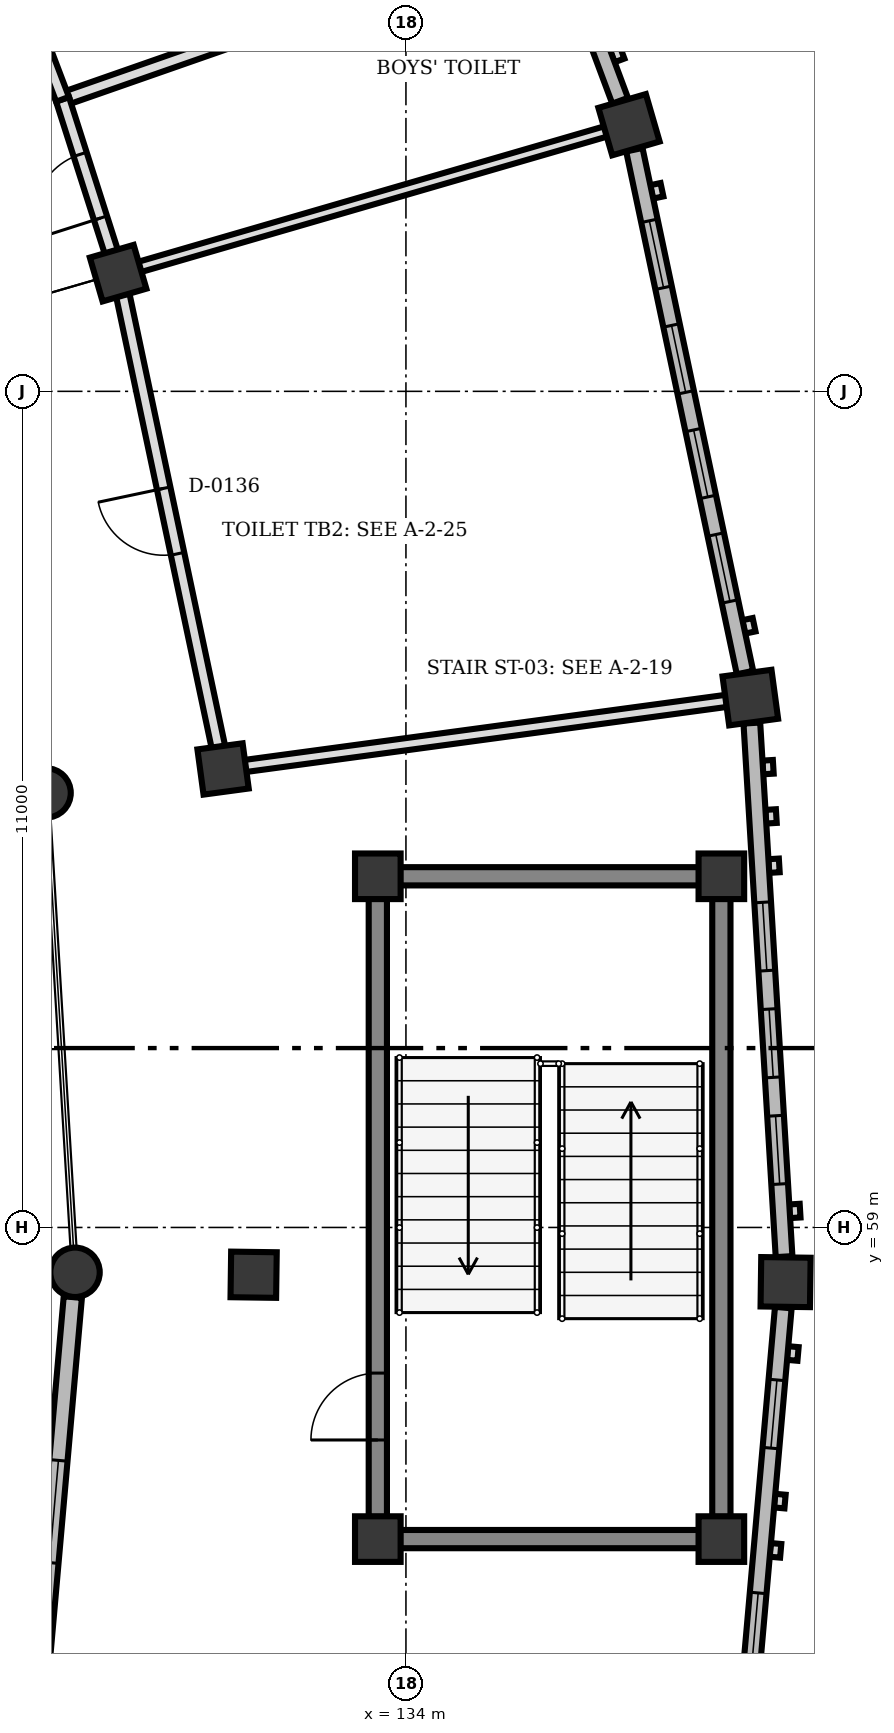
"""IFC4 building model, lengths in metres.
Left out: names, types, materials, properties, quantities, classifications, styles, units other than length and angle.
Written with IfcOpenShell. Run it as: python <this file> out.ifc"""

import sys

from ifc_helpers import new_model, si_unit, direction, frame, frame_2d, origin, origin_2d, place, context, subcontext, project, spatial, rectangle, circle, extrude, element, fill, save


model = new_model("IFC4")
c1 = context("Model", 3, precision=1e-05, world=origin(), true_north=direction((0.0, 1.0)))
c2 = subcontext(c1, "Body", "Model", "MODEL_VIEW")
j1 = project(units=[si_unit("LENGTHUNIT", "METRE"), si_unit("PLANEANGLEUNIT", "RADIAN")], contexts=[c1])
p1 = place(None, origin())
s1 = spatial("IfcSite", under=j1, at=p1, CompositionType="ELEMENT")
p2 = place(p1, origin())
s2 = spatial("IfcBuilding", under=s1, at=p2, CompositionType="ELEMENT")
p3 = place(p2, origin())
s3 = spatial("IfcBuildingStorey", under=s2, at=p3, CompositionType="ELEMENT", Elevation=0.0)
for number, where, z_axis, x_axis in (
    (1, (133.63, 54.9, 0.0), (0.0, 0.0, 1.0), (1.0, 0.0, 0.0)),
    (2, (138.15, 54.9, 0.0), (0.0, 0.0, 1.0), (1.0, 0.0, 0.0)),
    (3, (138.15, 63.62, 0.0), (0.0, 0.0, 1.0), (1.0, 0.0, 0.0)),
    (4, (133.63, 63.62, 0.0), (0.0, 0.0, 1.0), (1.0, 0.0, 0.0)),
):
    element("IfcColumn", number, at=place(p3, frame(where, z_axis=z_axis, x_axis=x_axis)), inside=s3, PredefinedType="COLUMN", context=c2, shape_type="SweptSolid", body=[
        extrude(rectangle(XDim=0.6, YDim=0.6, at=origin_2d()), origin(), (0.0, 0.0, 1.0), 4.5),
    ])
for number, where, z_axis, x_axis in (
    (5, (129.646, 58.41, 0.0), (0.0, 0.0, 1.0), (1.0, 0.0, 0.0)),
    (6, (129.265, 64.717, 0.0), (0.0, 0.0, 1.0), (1.0, 0.0, 0.0)),
):
    element("IfcColumn", number, at=place(p3, frame(where, z_axis=z_axis, x_axis=x_axis)), inside=s3, PredefinedType="COLUMN", context=c2, shape_type="SweptSolid", body=[
        extrude(circle(Radius=0.325, at=origin_2d()), origin(), (0.0, 0.0, 1.0), 4.5),
    ])
for number, where, z_axis, x_axis in (
    (7, (131.996, 58.378, 0.0), (0.0, 0.0, 1.0), (1.0, -0.014, 0.0)),
    (8, (131.594, 65.032, 0.0), (0.0, 0.0, 1.0), (0.991, 0.134, 0.0)),
    (9, (130.213, 71.555, 0.0), (0.0, 0.0, 1.0), (0.96, 0.279, 0.0)),
):
    element("IfcColumn", number, at=place(p3, frame(where, z_axis=z_axis, x_axis=x_axis)), inside=s3, PredefinedType="COLUMN", context=c2, shape_type="SweptSolid", body=[
        extrude(rectangle(XDim=0.6, YDim=0.6, at=origin_2d()), origin(), (0.0, 0.0, 1.0), 4.5),
    ])
for number, where, z_axis, x_axis in (
    (10, (138.995, 58.281, 0.0), (0.0, 0.0, 1.0), (1.0, -0.014, 0.0)),
    (11, (138.531, 65.971, 0.0), (0.0, 0.0, 1.0), (0.991, 0.134, 0.0)),
    (12, (136.935, 73.508, 0.0), (0.0, 0.0, 1.0), (0.96, 0.279, 0.0)),
):
    element("IfcColumn", number, at=place(p3, frame(where, z_axis=z_axis, x_axis=x_axis)), inside=s3, PredefinedType="COLUMN", context=c2, shape_type="SweptSolid", body=[
        extrude(rectangle(XDim=0.65, YDim=0.65, at=origin_2d()), origin(), (0.0, 0.0, 1.0), 4.5),
    ])
p4 = place(p3, frame((138.965, 57.946, 0.0), z_axis=(0.0, 0.0, 1.0), x_axis=(-0.087777274836, -0.996140125696, 0.0)))
e13 = element("IfcWall", 13, at=p4, inside=s3, PredefinedType="SOLIDWALL", context=c2, shape_type="SweptSolid", body=[
    extrude(rectangle(XDim=7.031, YDim=0.22, at=frame_2d((3.516, 0.0))), origin(), (0.0, 0.0, 1.0), 3.55),
])
p5 = place(p4, frame((0.956, 0.0, 0.85)))
e14 = element("IfcOpeningElement", 14, at=p5, cuts=e13, PredefinedType="OPENING", context=c2, shape_type="SweptSolid", body=[
    extrude(rectangle(XDim=0.9, YDim=1.4, at=frame_2d((0.45, 0.7))), frame((0.0, 0.12, 0.0), z_axis=(0.0, -1.0, 0.0), x_axis=(1.0, 0.0, 0.0)), (0.0, 0.0, 1.0), 0.24),
])
p6 = place(p4, frame((3.769, 0.0, 0.85)))
e15 = element("IfcOpeningElement", 15, at=p6, cuts=e13, PredefinedType="OPENING", context=c2, shape_type="SweptSolid", body=[
    extrude(rectangle(XDim=0.9, YDim=1.4, at=frame_2d((0.45, 0.7))), frame((0.0, 0.12, 0.0), z_axis=(0.0, -1.0, 0.0), x_axis=(1.0, 0.0, 0.0)), (0.0, 0.0, 1.0), 0.24),
])
p7 = place(p4, frame((5.175, 0.0, 0.85)))
e16 = element("IfcOpeningElement", 16, at=p7, cuts=e13, PredefinedType="OPENING", context=c2, shape_type="SweptSolid", body=[
    extrude(rectangle(XDim=0.9, YDim=1.4, at=frame_2d((0.45, 0.7))), frame((0.0, 0.12, 0.0), z_axis=(0.0, -1.0, 0.0), x_axis=(1.0, 0.0, 0.0)), (0.0, 0.0, 1.0), 0.24),
])
p8 = place(p3, frame((129.12, 52.442, 0.0), z_axis=(0.0, 0.0, 1.0), x_axis=(0.087717690898, 0.996145374282, 0.0)))
e17 = element("IfcWall", 17, at=p8, inside=s3, PredefinedType="SOLIDWALL", context=c2, shape_type="SweptSolid", body=[
    extrude(rectangle(XDim=5.664, YDim=0.24, at=frame_2d((2.832, 0.0))), origin(), (0.0, 0.0, 1.0), 3.55),
])
p9 = place(p8, frame((2.157, 0.0, 0.9)))
e18 = element("IfcOpeningElement", 18, at=p9, cuts=e17, PredefinedType="OPENING", context=c2, shape_type="SweptSolid", body=[
    extrude(rectangle(XDim=1.35, YDim=1.7, at=frame_2d((0.675, 0.85))), frame((0.0, 0.13, 0.0), z_axis=(0.0, -1.0, 0.0), x_axis=(1.0, 0.0, 0.0)), (0.0, 0.0, 1.0), 0.26),
])
p10 = place(p3, frame((138.551, 65.636, 0.0), z_axis=(0.0, 0.0, 1.0), x_axis=(0.06029906372, -0.998180355905, 0.0)))
e19 = element("IfcWall", 19, at=p10, inside=s3, PredefinedType="SOLIDWALL", context=c2, shape_type="SweptSolid", body=[
    extrude(rectangle(XDim=7.033, YDim=0.22, at=frame_2d((3.516, 0.0))), origin(), (0.0, 0.0, 1.0), 3.55),
])
p11 = place(p10, frame((2.363, 0.0, 0.85)))
e20 = element("IfcOpeningElement", 20, at=p11, cuts=e19, PredefinedType="OPENING", context=c2, shape_type="SweptSolid", body=[
    extrude(rectangle(XDim=0.9, YDim=1.4, at=frame_2d((0.45, 0.7))), frame((0.0, 0.12, 0.0), z_axis=(0.0, -1.0, 0.0), x_axis=(1.0, 0.0, 0.0)), (0.0, 0.0, 1.0), 0.24),
])
p12 = place(p10, frame((3.77, 0.0, 0.85)))
e21 = element("IfcOpeningElement", 21, at=p12, cuts=e19, PredefinedType="OPENING", context=c2, shape_type="SweptSolid", body=[
    extrude(rectangle(XDim=0.9, YDim=1.4, at=frame_2d((0.45, 0.7))), frame((0.0, 0.12, 0.0), z_axis=(0.0, -1.0, 0.0), x_axis=(1.0, 0.0, 0.0)), (0.0, 0.0, 1.0), 0.24),
])
p13 = place(p10, frame((5.176, 0.0, 0.85)))
e22 = element("IfcOpeningElement", 22, at=p13, cuts=e19, PredefinedType="OPENING", context=c2, shape_type="SweptSolid", body=[
    extrude(rectangle(XDim=0.9, YDim=1.4, at=frame_2d((0.45, 0.7))), frame((0.0, 0.12, 0.0), z_axis=(0.0, -1.0, 0.0), x_axis=(1.0, 0.0, 0.0)), (0.0, 0.0, 1.0), 0.24),
])
p14 = place(p3, frame((137.005, 73.179, 0.0), z_axis=(0.0, 0.0, 1.0), x_axis=(0.207081302077, -0.978323736976, 0.0)))
e23 = element("IfcWall", 23, at=p14, inside=s3, PredefinedType="SOLIDWALL", context=c2, shape_type="SweptSolid", body=[
    extrude(rectangle(XDim=7.031, YDim=0.22, at=frame_2d((3.516, 0.0))), origin(), (0.0, 0.0, 1.0), 3.55),
])
p15 = place(p14, frame((0.956, 0.0, 0.85)))
e24 = element("IfcOpeningElement", 24, at=p15, cuts=e23, PredefinedType="OPENING", context=c2, shape_type="SweptSolid", body=[
    extrude(rectangle(XDim=0.9, YDim=1.4, at=frame_2d((0.45, 0.7))), frame((0.0, 0.12, 0.0), z_axis=(0.0, -1.0, 0.0), x_axis=(1.0, 0.0, 0.0)), (0.0, 0.0, 1.0), 0.24),
])
p16 = place(p14, frame((2.363, 0.0, 0.85)))
e25 = element("IfcOpeningElement", 25, at=p16, cuts=e23, PredefinedType="OPENING", context=c2, shape_type="SweptSolid", body=[
    extrude(rectangle(XDim=0.9, YDim=1.4, at=frame_2d((0.45, 0.7))), frame((0.0, 0.12, 0.0), z_axis=(0.0, -1.0, 0.0), x_axis=(1.0, 0.0, 0.0)), (0.0, 0.0, 1.0), 0.24),
])
p17 = place(p14, frame((3.769, 0.0, 0.85)))
e26 = element("IfcOpeningElement", 26, at=p17, cuts=e23, PredefinedType="OPENING", context=c2, shape_type="SweptSolid", body=[
    extrude(rectangle(XDim=0.9, YDim=1.4, at=frame_2d((0.45, 0.7))), frame((0.0, 0.12, 0.0), z_axis=(0.0, -1.0, 0.0), x_axis=(1.0, 0.0, 0.0)), (0.0, 0.0, 1.0), 0.24),
])
p18 = place(p14, frame((5.175, 0.0, 0.85)))
e27 = element("IfcOpeningElement", 27, at=p18, cuts=e23, PredefinedType="OPENING", context=c2, shape_type="SweptSolid", body=[
    extrude(rectangle(XDim=0.9, YDim=1.4, at=frame_2d((0.45, 0.7))), frame((0.0, 0.12, 0.0), z_axis=(0.0, -1.0, 0.0), x_axis=(1.0, 0.0, 0.0)), (0.0, 0.0, 1.0), 0.24),
])
p19 = place(p3, frame((134.361, 80.411, 0.0), z_axis=(0.0, 0.0, 1.0), x_axis=(0.349448583385, -0.936955541939, 0.0)))
e28 = element("IfcWall", 28, at=p19, inside=s3, PredefinedType="SOLIDWALL", context=c2, shape_type="SweptSolid", body=[
    extrude(rectangle(XDim=7.031, YDim=0.22, at=frame_2d((3.516, 0.0))), origin(), (0.0, 0.0, 1.0), 3.55),
])
p20 = place(p19, frame((0.584, 0.0, 1.15)))
e29 = element("IfcOpeningElement", 29, at=p20, cuts=e28, PredefinedType="OPENING", context=c2, shape_type="SweptSolid", body=[
    extrude(rectangle(XDim=0.8, YDim=1.1, at=frame_2d((0.4, 0.55))), frame((0.0, 0.12, 0.0), z_axis=(0.0, -1.0, 0.0), x_axis=(1.0, 0.0, 0.0)), (0.0, 0.0, 1.0), 0.24),
])
p21 = place(p19, frame((2.834, 0.0, 1.15)))
e30 = element("IfcOpeningElement", 30, at=p21, cuts=e28, PredefinedType="OPENING", context=c2, shape_type="SweptSolid", body=[
    extrude(rectangle(XDim=0.8, YDim=1.1, at=frame_2d((0.4, 0.55))), frame((0.0, 0.12, 0.0), z_axis=(0.0, -1.0, 0.0), x_axis=(1.0, 0.0, 0.0)), (0.0, 0.0, 1.0), 0.24),
])
p22 = place(p19, frame((5.366, 0.0, 1.15)))
e31 = element("IfcOpeningElement", 31, at=p22, cuts=e28, PredefinedType="OPENING", context=c2, shape_type="SweptSolid", body=[
    extrude(rectangle(XDim=0.8, YDim=1.1, at=frame_2d((0.4, 0.55))), frame((0.0, 0.12, 0.0), z_axis=(0.0, -1.0, 0.0), x_axis=(1.0, 0.0, 0.0)), (0.0, 0.0, 1.0), 0.24),
])
p23 = place(p3, frame((133.63, 55.192, 0.0), z_axis=(0.0, 0.0, 1.0), x_axis=(0.0, 1.0, 0.0)))
e32 = element("IfcWall", 32, at=p23, inside=s3, PredefinedType="SHEAR", context=c2, shape_type="SweptSolid", body=[
    extrude(rectangle(XDim=8.136, YDim=0.24, at=frame_2d((4.068, 0.0))), origin(), (0.0, 0.0, 1.0), 4.24),
])
p24 = place(p23, frame((1.012, 0.0, 0.0)))
e33 = element("IfcOpeningElement", 33, at=p24, cuts=e32, PredefinedType="OPENING", context=c2, shape_type="SweptSolid", body=[
    extrude(rectangle(XDim=0.88, YDim=2.1, at=frame_2d((0.44, 1.05))), frame((0.0, 0.13, 0.0), z_axis=(0.0, -1.0, 0.0), x_axis=(1.0, 0.0, 0.0)), (0.0, 0.0, 1.0), 0.26),
])
p25 = place(p3, frame((138.15, 63.328, 0.0), z_axis=(0.0, 0.0, 1.0), x_axis=(0.0, -1.0, 0.0)))
e34 = element("IfcWall", 34, at=p25, inside=s3, PredefinedType="SHEAR", context=c2, shape_type="SweptSolid", body=[
    extrude(rectangle(XDim=8.136, YDim=0.24, at=frame_2d((4.068, 0.0))), origin(), (0.0, 0.0, 1.0), 4.24),
])
for number, where, z_axis, x_axis in (
    (35, (137.858, 54.9, 0.0), (0.0, 0.0, 1.0), (-1.0, 0.0, 0.0)),
    (36, (137.858, 63.62, 0.0), (0.0, 0.0, 1.0), (-1.0, 0.0, 0.0)),
):
    element("IfcWall", number, at=place(p3, frame(where, z_axis=z_axis, x_axis=x_axis)), inside=s3, PredefinedType="SHEAR", context=c2, shape_type="SweptSolid", body=[
        extrude(rectangle(XDim=3.936, YDim=0.24, at=frame_2d((1.968, 0.0))), origin(), (0.0, 0.0, 1.0), 4.24),
    ])
p26 = place(p3, frame((131.883, 65.071, 0.0), z_axis=(0.0, 0.0, 1.0), x_axis=(0.990971868219, 0.134069968295, 0.0)))
e37 = element("IfcWall", 37, at=p26, inside=s3, PredefinedType="PARTITIONING", context=c2, shape_type="SweptSolid", body=[
    extrude(rectangle(XDim=6.392, YDim=0.16, at=frame_2d((3.196, 0.0))), origin(), (0.0, 0.0, 1.0), 3.572),
])
p27 = place(p3, frame((130.493, 71.636, 0.0), z_axis=(0.0, 0.0, 1.0), x_axis=(0.960267345013, 0.279081755231, 0.0)))
e38 = element("IfcWall", 38, at=p27, inside=s3, PredefinedType="PARTITIONING", context=c2, shape_type="SweptSolid", body=[
    extrude(rectangle(XDim=6.392, YDim=0.14, at=frame_2d((3.196, 0.0))), origin(), (0.0, 0.0, 1.0), 3.572),
])
p28 = place(p3, frame((129.482, 73.842, 0.0), z_axis=(0.0, 0.0, 1.0), x_axis=(0.944038525113, 0.329835205979, 0.0)))
e39 = element("IfcWall", 39, at=p28, inside=s3, PredefinedType="PARTITIONING", context=c2, shape_type="SweptSolid", body=[
    extrude(rectangle(XDim=6.755, YDim=0.18, at=frame_2d((3.377, 0.0))), origin(), (0.0, 0.0, 1.0), 3.572),
])
p29 = place(p3, frame((131.533, 65.318, 0.0), z_axis=(0.0, 0.0, 1.0), x_axis=(-0.206987404473, 0.978343607527, 0.0)))
e40 = element("IfcWall", 40, at=p29, inside=s3, PredefinedType="PARTITIONING", context=c2, shape_type="SweptSolid", body=[
    extrude(rectangle(XDim=6.083, YDim=0.18, at=frame_2d((3.042, 0.0))), origin(), (0.0, 0.0, 1.0), 3.572),
])
p30 = place(p29, frame((2.601, 0.0, 0.0)))
e41 = element("IfcOpeningElement", 41, at=p30, cuts=e40, PredefinedType="OPENING", context=c2, shape_type="SweptSolid", body=[
    extrude(rectangle(XDim=0.88, YDim=2.1, at=frame_2d((0.44, 1.05))), frame((0.0, 0.1, 0.0), z_axis=(0.0, -1.0, 0.0), x_axis=(1.0, 0.0, 0.0)), (0.0, 0.0, 1.0), 0.2),
])
p31 = place(p3, frame((130.124, 71.833, 0.0), z_axis=(0.0, 0.0, 1.0), x_axis=(-0.304431303169, 0.952534294212, 0.0)))
e42 = element("IfcWall", 42, at=p31, inside=s3, PredefinedType="PARTITIONING", context=c2, shape_type="SweptSolid", body=[
    extrude(rectangle(XDim=2.109, YDim=0.18, at=frame_2d((1.055, 0.0))), origin(), (0.0, 0.0, 1.0), 3.572),
])
p32 = place(p31, frame((0.469, 0.0, 0.0)))
e43 = element("IfcOpeningElement", 43, at=p32, cuts=e42, PredefinedType="OPENING", context=c2, shape_type="SweptSolid", body=[
    extrude(rectangle(XDim=0.88, YDim=2.1, at=frame_2d((0.44, 1.05))), frame((0.0, 0.1, 0.0), z_axis=(0.0, -1.0, 0.0), x_axis=(1.0, 0.0, 0.0)), (0.0, 0.0, 1.0), 0.2),
])
p33 = place(p3, frame((129.482, 73.842, 0.0), z_axis=(0.0, 0.0, 1.0), x_axis=(-0.35507389875, 0.934838235432, 0.0)))
e44 = element("IfcWall", 44, at=p33, inside=s3, PredefinedType="PARTITIONING", context=c2, shape_type="SweptSolid", body=[
    extrude(rectangle(XDim=2.402, YDim=0.18, at=frame_2d((1.201, 0.0))), origin(), (0.0, 0.0, 1.0), 3.572),
])
p34 = place(p33, frame((0.761, 0.0, 0.0)))
e45 = element("IfcOpeningElement", 45, at=p34, cuts=e44, PredefinedType="OPENING", context=c2, shape_type="SweptSolid", body=[
    extrude(rectangle(XDim=0.88, YDim=2.1, at=frame_2d((0.44, 1.05))), frame((0.0, 0.1, 0.0), z_axis=(0.0, -1.0, 0.0), x_axis=(1.0, 0.0, 0.0)), (0.0, 0.0, 1.0), 0.2),
])
p35 = place(p5, origin())
e46 = element("IfcWindow", 46, at=p35, inside=s3, PartitioningType="SINGLE_PANEL", PredefinedType="WINDOW", context=c2, shape_type="SweptSolid", body=[
    extrude(rectangle(XDim=0.9, YDim=1.4, at=frame_2d((0.45, 0.7))), frame((0.0, 0.03, 0.0), z_axis=(0.0, -1.0, 0.0), x_axis=(1.0, 0.0, 0.0)), (0.0, 0.0, 1.0), 0.06),
])
fill(e14, e46)
p36 = place(p6, origin())
e47 = element("IfcWindow", 47, at=p36, inside=s3, PartitioningType="SINGLE_PANEL", PredefinedType="WINDOW", context=c2, shape_type="SweptSolid", body=[
    extrude(rectangle(XDim=0.9, YDim=1.4, at=frame_2d((0.45, 0.7))), frame((0.0, 0.03, 0.0), z_axis=(0.0, -1.0, 0.0), x_axis=(1.0, 0.0, 0.0)), (0.0, 0.0, 1.0), 0.06),
])
fill(e15, e47)
p37 = place(p9, origin())
e48 = element("IfcWindow", 48, at=p37, inside=s3, PartitioningType="SINGLE_PANEL", PredefinedType="WINDOW", context=c2, shape_type="SweptSolid", body=[
    extrude(rectangle(XDim=1.35, YDim=1.7, at=frame_2d((0.675, 0.85))), frame((0.0, 0.03, 0.0), z_axis=(0.0, -1.0, 0.0), x_axis=(1.0, 0.0, 0.0)), (0.0, 0.0, 1.0), 0.06),
])
fill(e18, e48)
p38 = place(p11, origin())
e49 = element("IfcWindow", 49, at=p38, inside=s3, PartitioningType="SINGLE_PANEL", PredefinedType="WINDOW", context=c2, shape_type="SweptSolid", body=[
    extrude(rectangle(XDim=0.9, YDim=1.4, at=frame_2d((0.45, 0.7))), frame((0.0, 0.03, 0.0), z_axis=(0.0, -1.0, 0.0), x_axis=(1.0, 0.0, 0.0)), (0.0, 0.0, 1.0), 0.06),
])
fill(e20, e49)
p39 = place(p12, origin())
e50 = element("IfcWindow", 50, at=p39, inside=s3, PartitioningType="SINGLE_PANEL", PredefinedType="WINDOW", context=c2, shape_type="SweptSolid", body=[
    extrude(rectangle(XDim=0.9, YDim=1.4, at=frame_2d((0.45, 0.7))), frame((0.0, 0.03, 0.0), z_axis=(0.0, -1.0, 0.0), x_axis=(1.0, 0.0, 0.0)), (0.0, 0.0, 1.0), 0.06),
])
fill(e21, e50)
p40 = place(p13, origin())
e51 = element("IfcWindow", 51, at=p40, inside=s3, PartitioningType="SINGLE_PANEL", PredefinedType="WINDOW", context=c2, shape_type="SweptSolid", body=[
    extrude(rectangle(XDim=0.9, YDim=1.4, at=frame_2d((0.45, 0.7))), frame((0.0, 0.03, 0.0), z_axis=(0.0, -1.0, 0.0), x_axis=(1.0, 0.0, 0.0)), (0.0, 0.0, 1.0), 0.06),
])
fill(e22, e51)
p41 = place(p15, origin())
e52 = element("IfcWindow", 52, at=p41, inside=s3, PartitioningType="SINGLE_PANEL", PredefinedType="WINDOW", context=c2, shape_type="SweptSolid", body=[
    extrude(rectangle(XDim=0.9, YDim=1.4, at=frame_2d((0.45, 0.7))), frame((0.0, 0.03, 0.0), z_axis=(0.0, -1.0, 0.0), x_axis=(1.0, 0.0, 0.0)), (0.0, 0.0, 1.0), 0.06),
])
fill(e24, e52)
p42 = place(p16, origin())
e53 = element("IfcWindow", 53, at=p42, inside=s3, PartitioningType="SINGLE_PANEL", PredefinedType="WINDOW", context=c2, shape_type="SweptSolid", body=[
    extrude(rectangle(XDim=0.9, YDim=1.4, at=frame_2d((0.45, 0.7))), frame((0.0, 0.03, 0.0), z_axis=(0.0, -1.0, 0.0), x_axis=(1.0, 0.0, 0.0)), (0.0, 0.0, 1.0), 0.06),
])
fill(e25, e53)
p43 = place(p17, origin())
e54 = element("IfcWindow", 54, at=p43, inside=s3, PartitioningType="SINGLE_PANEL", PredefinedType="WINDOW", context=c2, shape_type="SweptSolid", body=[
    extrude(rectangle(XDim=0.9, YDim=1.4, at=frame_2d((0.45, 0.7))), frame((0.0, 0.03, 0.0), z_axis=(0.0, -1.0, 0.0), x_axis=(1.0, 0.0, 0.0)), (0.0, 0.0, 1.0), 0.06),
])
fill(e26, e54)
p44 = place(p18, origin())
e55 = element("IfcWindow", 55, at=p44, inside=s3, PartitioningType="SINGLE_PANEL", PredefinedType="WINDOW", context=c2, shape_type="SweptSolid", body=[
    extrude(rectangle(XDim=0.9, YDim=1.4, at=frame_2d((0.45, 0.7))), frame((0.0, 0.03, 0.0), z_axis=(0.0, -1.0, 0.0), x_axis=(1.0, 0.0, 0.0)), (0.0, 0.0, 1.0), 0.06),
])
fill(e27, e55)
p45 = place(p24, origin())
e56 = element("IfcDoor", 56, at=p45, inside=s3, OperationType="SINGLE_SWING_LEFT", PredefinedType="DOOR", context=c2, shape_type="SweptSolid", body=[
    extrude(rectangle(XDim=0.88, YDim=2.1, at=frame_2d((0.44, 1.05))), frame((0.0, 0.025, 0.0), z_axis=(0.0, -1.0, 0.0), x_axis=(1.0, 0.0, 0.0)), (0.0, 0.0, 1.0), 0.05),
])
fill(e33, e56)
p46 = place(p30, origin())
e57 = element("IfcDoor", 57, at=p46, inside=s3, OperationType="SINGLE_SWING_RIGHT", PredefinedType="DOOR", context=c2, shape_type="SweptSolid", body=[
    extrude(rectangle(XDim=0.88, YDim=2.1, at=frame_2d((0.44, 1.05))), frame((0.0, 0.025, 0.0), z_axis=(0.0, -1.0, 0.0), x_axis=(1.0, 0.0, 0.0)), (0.0, 0.0, 1.0), 0.05),
])
fill(e41, e57)
p47 = place(p32, origin())
e58 = element("IfcDoor", 58, at=p47, inside=s3, OperationType="SINGLE_SWING_LEFT", PredefinedType="DOOR", context=c2, shape_type="SweptSolid", body=[
    extrude(rectangle(XDim=0.88, YDim=2.1, at=frame_2d((0.44, 1.05))), frame((0.0, 0.025, 0.0), z_axis=(0.0, -1.0, 0.0), x_axis=(1.0, 0.0, 0.0)), (0.0, 0.0, 1.0), 0.05),
])
fill(e43, e58)
save(model, sys.argv[1])
